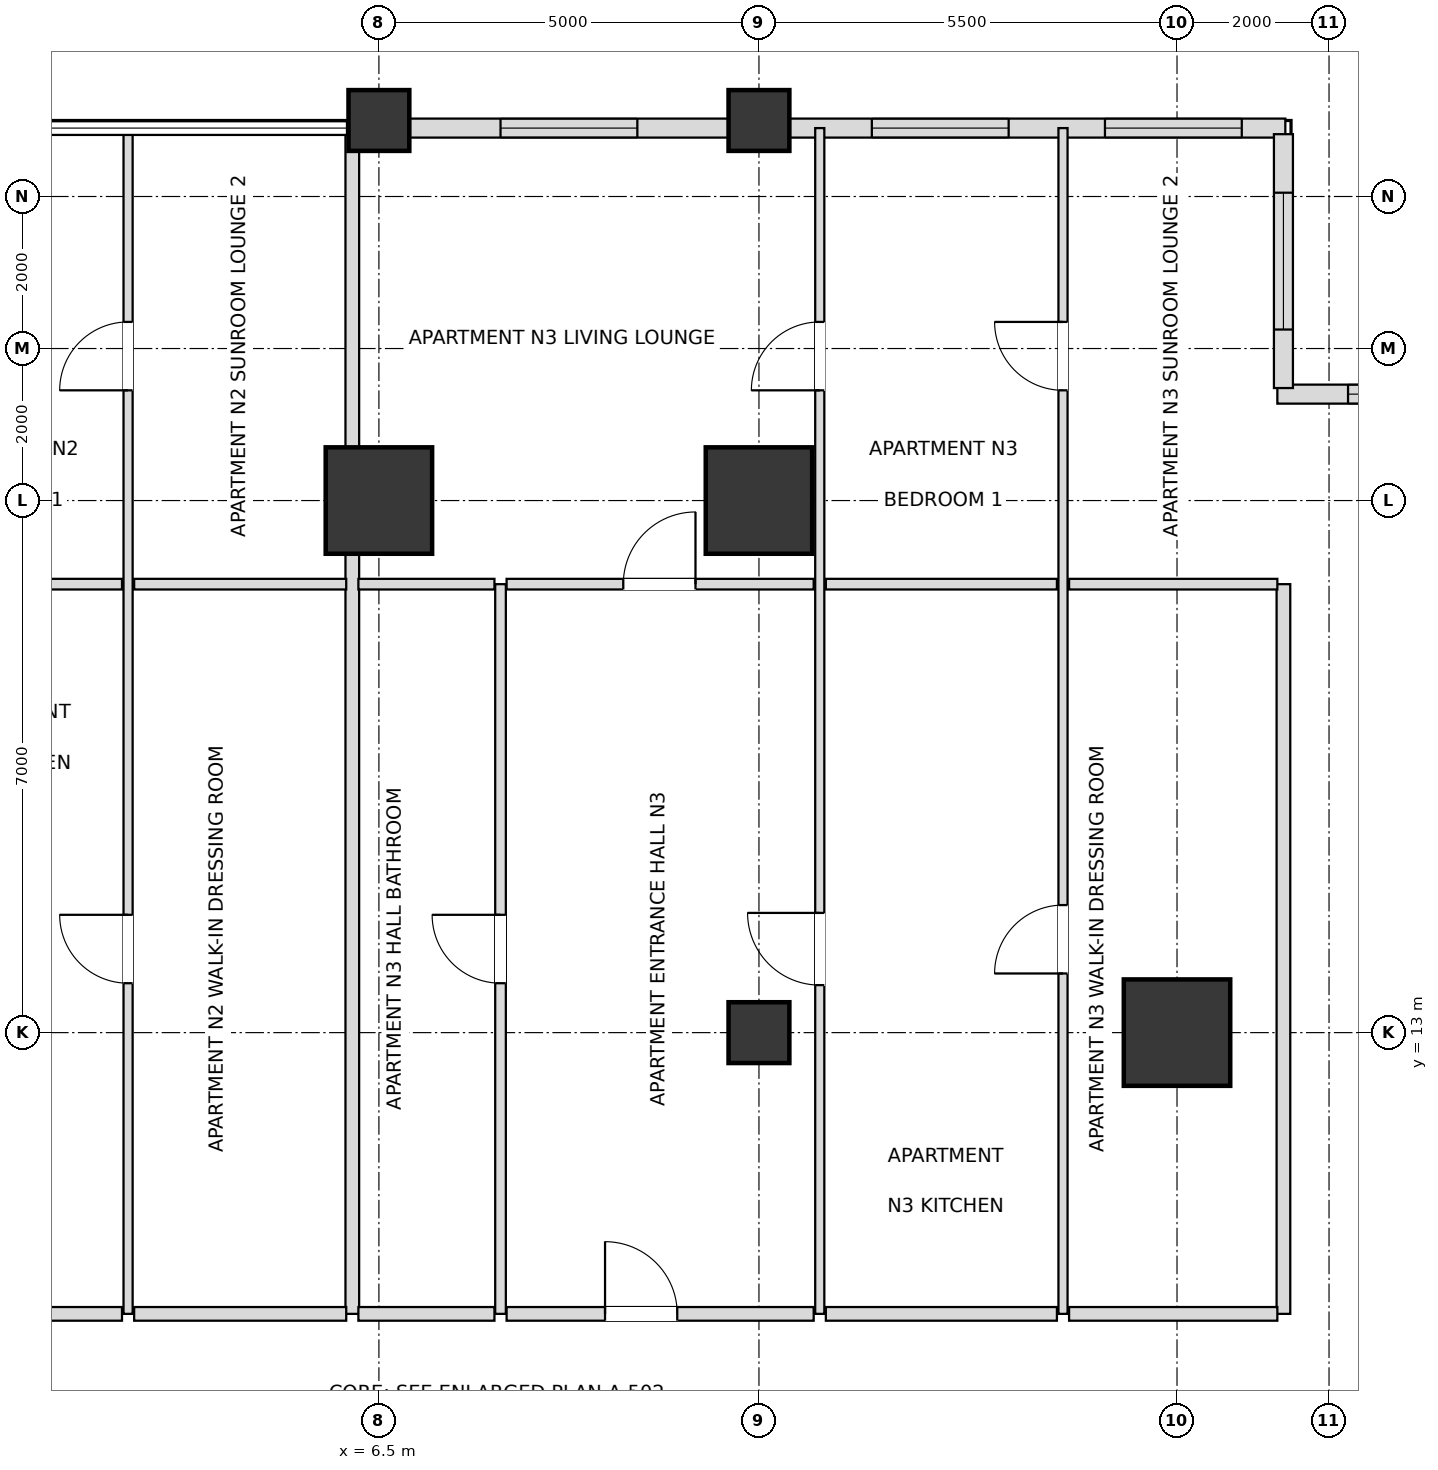
"""IFC4 building model, lengths in metres.
Left out: names, types, materials, properties, quantities, classifications, styles, units other than length and angle.
Written with IfcOpenShell. Run it as: python <this file> out.ifc"""

import sys

from ifc_helpers import new_model, si_unit, direction, frame, frame_2d, origin, origin_2d, place, context, subcontext, project, spatial, rectangle, extrude, element, fill, save


model = new_model("IFC4")
c1 = context("Model", 3, precision=1e-05, world=origin(), true_north=direction((0.0, 1.0)))
c2 = subcontext(c1, "Body", "Model", "MODEL_VIEW")
j1 = project(units=[si_unit("LENGTHUNIT", "METRE"), si_unit("PLANEANGLEUNIT", "RADIAN")], contexts=[c1])
p1 = place(None, origin())
s1 = spatial("IfcSite", under=j1, at=p1, CompositionType="ELEMENT")
p2 = place(p1, origin())
s2 = spatial("IfcBuilding", under=s1, at=p2, CompositionType="ELEMENT")
p3 = place(p2, frame((0.0, 0.0, 46.8)))
s3 = spatial("IfcBuildingStorey", under=s2, at=p3, CompositionType="ELEMENT", Elevation=46.8)
for number, where, z_axis, x_axis in (
    (1, (17.0, 13.0, 0.0), (0.0, 0.0, 1.0), (1.0, 0.0, 0.0)),
    (2, (11.5, 20.0, 0.0), (0.0, 0.0, 1.0), (1.0, 0.0, 0.0)),
    (3, (6.5, 20.0, 0.0), (0.0, 0.0, 1.0), (1.0, 0.0, 0.0)),
):
    element("IfcColumn", number, at=place(p3, frame(where, z_axis=z_axis, x_axis=x_axis)), inside=s3, PredefinedType="USERDEFINED", context=c2, shape_type="SweptSolid", body=[
        extrude(rectangle(XDim=1.4, YDim=1.4, at=origin_2d()), origin(), (0.0, 0.0, 1.0), 3.6),
    ])
for number, where, z_axis, x_axis in (
    (4, (11.5, 13.0, 0.0), (0.0, 0.0, 1.0), (1.0, 0.0, 0.0)),
    (5, (6.5, 25.0, 0.0), (0.0, 0.0, 1.0), (1.0, 0.0, 0.0)),
    (6, (11.5, 25.0, 0.0), (0.0, 0.0, 1.0), (1.0, 0.0, 0.0)),
):
    element("IfcColumn", number, at=place(p3, frame(where, z_axis=z_axis, x_axis=x_axis)), inside=s3, PredefinedType="COLUMN", context=c2, shape_type="SweptSolid", body=[
        extrude(rectangle(XDim=0.8, YDim=0.8, at=origin_2d()), origin(), (0.0, 0.0, 1.0), 3.6),
    ])
p4 = place(p3, frame((18.425, 24.9, 0.0), z_axis=(0.0, 0.0, 1.0), x_axis=(-1.0, 0.0, 0.0)))
e7 = element("IfcWall", 7, at=p4, inside=s3, PredefinedType="SOLIDWALL", context=c2, shape_type="SweptSolid", body=[
    extrude(rectangle(XDim=6.53, YDim=0.25, at=frame_2d((3.265, 0.0))), origin(), (0.0, 0.0, 1.0), 2.736),
])
p5 = place(p4, frame((0.573, 0.0, 0.72)))
e8 = element("IfcOpeningElement", 8, at=p5, cuts=e7, PredefinedType="OPENING", context=c2, shape_type="SweptSolid", body=[
    extrude(rectangle(XDim=1.8, YDim=1.68, at=frame_2d((0.9, 0.84))), frame((0.0, 0.135, 0.0), z_axis=(0.0, -1.0, 0.0), x_axis=(1.0, 0.0, 0.0)), (0.0, 0.0, 1.0), 0.27),
])
p6 = place(p4, frame((3.64, 0.0, 0.72)))
e9 = element("IfcOpeningElement", 9, at=p6, cuts=e7, PredefinedType="OPENING", context=c2, shape_type="SweptSolid", body=[
    extrude(rectangle(XDim=1.8, YDim=1.68, at=frame_2d((0.9, 0.84))), frame((0.0, 0.135, 0.0), z_axis=(0.0, -1.0, 0.0), x_axis=(1.0, 0.0, 0.0)), (0.0, 0.0, 1.0), 0.27),
])
p7 = place(p3, frame((11.105, 24.9, 0.0), z_axis=(0.0, 0.0, 1.0), x_axis=(-1.0, 0.0, 0.0)))
e10 = element("IfcWall", 10, at=p7, inside=s3, PredefinedType="SOLIDWALL", context=c2, shape_type="SweptSolid", body=[
    extrude(rectangle(XDim=4.21, YDim=0.25, at=frame_2d((2.105, 0.0))), origin(), (0.0, 0.0, 1.0), 2.736),
])
p8 = place(p7, frame((1.205, 0.0, 0.72)))
e11 = element("IfcOpeningElement", 11, at=p8, cuts=e10, PredefinedType="OPENING", context=c2, shape_type="SweptSolid", body=[
    extrude(rectangle(XDim=1.8, YDim=1.68, at=frame_2d((0.9, 0.84))), frame((0.0, 0.135, 0.0), z_axis=(0.0, -1.0, 0.0), x_axis=(1.0, 0.0, 0.0)), (0.0, 0.0, 1.0), 0.27),
])
p9 = place(p3, frame((21.98, 21.4, 0.0), z_axis=(0.0, 0.0, 1.0), x_axis=(-1.0, 0.0, 0.0)))
e12 = element("IfcWall", 12, at=p9, inside=s3, PredefinedType="SOLIDWALL", context=c2, shape_type="SweptSolid", body=[
    extrude(rectangle(XDim=3.66, YDim=0.25, at=frame_2d((1.83, 0.0))), origin(), (0.0, 0.0, 1.0), 2.736),
])
p10 = place(p9, frame((0.93, 0.0, 0.72)))
e13 = element("IfcOpeningElement", 13, at=p10, cuts=e12, PredefinedType="OPENING", context=c2, shape_type="SweptSolid", body=[
    extrude(rectangle(XDim=1.8, YDim=1.68, at=frame_2d((0.9, 0.84))), frame((0.0, 0.135, 0.0), z_axis=(0.0, -1.0, 0.0), x_axis=(1.0, 0.0, 0.0)), (0.0, 0.0, 1.0), 0.27),
])
p11 = place(p3, frame((18.4, 21.48, 0.0), z_axis=(0.0, 0.0, 1.0), x_axis=(0.0, 1.0, 0.0)))
e14 = element("IfcWall", 14, at=p11, inside=s3, PredefinedType="SOLIDWALL", context=c2, shape_type="SweptSolid", body=[
    extrude(rectangle(XDim=3.34, YDim=0.25, at=frame_2d((1.67, 0.0))), origin(), (0.0, 0.0, 1.0), 2.736),
])
p12 = place(p11, frame((0.77, 0.0, 0.72)))
e15 = element("IfcOpeningElement", 15, at=p12, cuts=e14, PredefinedType="OPENING", context=c2, shape_type="SweptSolid", body=[
    extrude(rectangle(XDim=1.8, YDim=1.68, at=frame_2d((0.9, 0.84))), frame((0.0, 0.135, 0.0), z_axis=(0.0, -1.0, 0.0), x_axis=(1.0, 0.0, 0.0)), (0.0, 0.0, 1.0), 0.27),
])
p13 = place(p3, frame((3.2, 9.3, 0.0), z_axis=(0.0, 0.0, 1.0), x_axis=(0.0, 1.0, 0.0)))
e16 = element("IfcWall", 16, at=p13, inside=s3, PredefinedType="PARTITIONING", context=c2, shape_type="SweptSolid", body=[
    extrude(rectangle(XDim=15.6, YDim=0.12, at=frame_2d((7.8, 0.0))), origin(), (0.0, 0.0, 1.0), 2.816),
])
p14 = place(p13, frame((4.35, 0.0, 0.0)))
e17 = element("IfcOpeningElement", 17, at=p14, cuts=e16, PredefinedType="OPENING", context=c2, shape_type="SweptSolid", body=[
    extrude(rectangle(XDim=0.9, YDim=2.1, at=frame_2d((0.45, 1.05))), frame((0.0, 0.07, 0.0), z_axis=(0.0, -1.0, 0.0), x_axis=(1.0, 0.0, 0.0)), (0.0, 0.0, 1.0), 0.14),
])
p15 = place(p13, frame((12.15, 0.0, 0.0)))
e18 = element("IfcOpeningElement", 18, at=p15, cuts=e16, PredefinedType="OPENING", context=c2, shape_type="SweptSolid", body=[
    extrude(rectangle(XDim=0.9, YDim=2.1, at=frame_2d((0.45, 1.05))), frame((0.0, 0.07, 0.0), z_axis=(0.0, -1.0, 0.0), x_axis=(1.0, 0.0, 0.0)), (0.0, 0.0, 1.0), 0.14),
])
p16 = place(p3, frame((6.15, 9.3, 0.0), z_axis=(0.0, 0.0, 1.0), x_axis=(0.0, 1.0, 0.0)))
e19 = element("IfcWall", 19, at=p16, inside=s3, PredefinedType="PARTITIONING", context=c2, shape_type="SweptSolid", body=[
    extrude(rectangle(XDim=15.6, YDim=0.18, at=frame_2d((7.8, 0.0))), origin(), (0.0, 0.0, 1.0), 2.816),
])
p17 = place(p3, frame((8.1, 9.3, 0.0), z_axis=(0.0, 0.0, 1.0), x_axis=(0.0, 1.0, 0.0)))
e20 = element("IfcWall", 20, at=p17, inside=s3, PredefinedType="PARTITIONING", context=c2, shape_type="SweptSolid", body=[
    extrude(rectangle(XDim=9.6, YDim=0.14, at=frame_2d((4.8, 0.0))), origin(), (0.0, 0.0, 1.0), 2.816),
])
p18 = place(p17, frame((4.35, 0.0, 0.0)))
e21 = element("IfcOpeningElement", 21, at=p18, cuts=e20, PredefinedType="OPENING", context=c2, shape_type="SweptSolid", body=[
    extrude(rectangle(XDim=0.9, YDim=2.1, at=frame_2d((0.45, 1.05))), frame((0.0, 0.08, 0.0), z_axis=(0.0, -1.0, 0.0), x_axis=(1.0, 0.0, 0.0)), (0.0, 0.0, 1.0), 0.16),
])
p19 = place(p3, frame((12.3, 9.3, 0.0), z_axis=(0.0, 0.0, 1.0), x_axis=(0.0, 1.0, 0.0)))
e22 = element("IfcWall", 22, at=p19, inside=s3, PredefinedType="PARTITIONING", context=c2, shape_type="SweptSolid", body=[
    extrude(rectangle(XDim=15.6, YDim=0.12, at=frame_2d((7.8, 0.0))), origin(), (0.0, 0.0, 1.0), 2.736),
])
p20 = place(p19, frame((4.325, 0.0, 0.0)))
e23 = element("IfcOpeningElement", 23, at=p20, cuts=e22, PredefinedType="OPENING", context=c2, shape_type="SweptSolid", body=[
    extrude(rectangle(XDim=0.95, YDim=2.1, at=frame_2d((0.475, 1.05))), frame((0.0, 0.07, 0.0), z_axis=(0.0, -1.0, 0.0), x_axis=(1.0, 0.0, 0.0)), (0.0, 0.0, 1.0), 0.14),
])
p21 = place(p19, frame((12.15, 0.0, 0.0)))
e24 = element("IfcOpeningElement", 24, at=p21, cuts=e22, PredefinedType="OPENING", context=c2, shape_type="SweptSolid", body=[
    extrude(rectangle(XDim=0.9, YDim=2.1, at=frame_2d((0.45, 1.05))), frame((0.0, 0.07, 0.0), z_axis=(0.0, -1.0, 0.0), x_axis=(1.0, 0.0, 0.0)), (0.0, 0.0, 1.0), 0.14),
])
p22 = place(p3, frame((15.5, 9.3, 0.0), z_axis=(0.0, 0.0, 1.0), x_axis=(0.0, 1.0, 0.0)))
e25 = element("IfcWall", 25, at=p22, inside=s3, PredefinedType="PARTITIONING", context=c2, shape_type="SweptSolid", body=[
    extrude(rectangle(XDim=15.6, YDim=0.12, at=frame_2d((7.8, 0.0))), origin(), (0.0, 0.0, 1.0), 2.736),
])
p23 = place(p22, frame((4.478, 0.0, 0.0)))
e26 = element("IfcOpeningElement", 26, at=p23, cuts=e25, PredefinedType="OPENING", context=c2, shape_type="SweptSolid", body=[
    extrude(rectangle(XDim=0.9, YDim=2.1, at=frame_2d((0.45, 1.05))), frame((0.0, 0.07, 0.0), z_axis=(0.0, -1.0, 0.0), x_axis=(1.0, 0.0, 0.0)), (0.0, 0.0, 1.0), 0.14),
])
p24 = place(p22, frame((12.15, 0.0, 0.0)))
e27 = element("IfcOpeningElement", 27, at=p24, cuts=e25, PredefinedType="OPENING", context=c2, shape_type="SweptSolid", body=[
    extrude(rectangle(XDim=0.9, YDim=2.1, at=frame_2d((0.45, 1.05))), frame((0.0, 0.07, 0.0), z_axis=(0.0, -1.0, 0.0), x_axis=(1.0, 0.0, 0.0)), (0.0, 0.0, 1.0), 0.14),
])
p25 = place(p3, frame((18.4, 9.3, 0.0), z_axis=(0.0, 0.0, 1.0), x_axis=(0.0, 1.0, 0.0)))
e28 = element("IfcWall", 28, at=p25, inside=s3, PredefinedType="PARTITIONING", context=c2, shape_type="SweptSolid", body=[
    extrude(rectangle(XDim=9.6, YDim=0.18, at=frame_2d((4.8, 0.0))), origin(), (0.0, 0.0, 1.0), 2.736),
])
p26 = place(p3, frame((0.08, 9.3, 0.0), z_axis=(0.0, 0.0, 1.0), x_axis=(1.0, 0.0, 0.0)))
e29 = element("IfcWall", 29, at=p26, inside=s3, PredefinedType="PARTITIONING", context=c2, shape_type="SweptSolid", body=[
    extrude(rectangle(XDim=3.04, YDim=0.18, at=frame_2d((1.52, 0.0))), origin(), (0.0, 0.0, 1.0), 3.38),
])
p27 = place(p3, frame((3.28, 9.3, 0.0), z_axis=(0.0, 0.0, 1.0), x_axis=(1.0, 0.0, 0.0)))
e30 = element("IfcWall", 30, at=p27, inside=s3, PredefinedType="PARTITIONING", context=c2, shape_type="SweptSolid", body=[
    extrude(rectangle(XDim=2.79, YDim=0.18, at=frame_2d((1.395, 0.0))), origin(), (0.0, 0.0, 1.0), 3.38),
])
p28 = place(p3, frame((6.23, 9.3, 0.0), z_axis=(0.0, 0.0, 1.0), x_axis=(1.0, 0.0, 0.0)))
e31 = element("IfcWall", 31, at=p28, inside=s3, PredefinedType="PARTITIONING", context=c2, shape_type="SweptSolid", body=[
    extrude(rectangle(XDim=1.79, YDim=0.18, at=frame_2d((0.895, 0.0))), origin(), (0.0, 0.0, 1.0), 2.816),
])
p29 = place(p3, frame((8.18, 9.3, 0.0), z_axis=(0.0, 0.0, 1.0), x_axis=(1.0, 0.0, 0.0)))
e32 = element("IfcWall", 32, at=p29, inside=s3, PredefinedType="PARTITIONING", context=c2, shape_type="SweptSolid", body=[
    extrude(rectangle(XDim=4.04, YDim=0.18, at=frame_2d((2.02, 0.0))), origin(), (0.0, 0.0, 1.0), 3.38),
])
p30 = place(p29, frame((1.295, 0.0, 0.0)))
e33 = element("IfcOpeningElement", 33, at=p30, cuts=e32, PredefinedType="OPENING", context=c2, shape_type="SweptSolid", body=[
    extrude(rectangle(XDim=0.95, YDim=2.15, at=frame_2d((0.475, 1.075))), frame((0.0, 0.1, 0.0), z_axis=(0.0, -1.0, 0.0), x_axis=(1.0, 0.0, 0.0)), (0.0, 0.0, 1.0), 0.2),
])
p31 = place(p3, frame((12.38, 9.3, 0.0), z_axis=(0.0, 0.0, 1.0), x_axis=(1.0, 0.0, 0.0)))
e34 = element("IfcWall", 34, at=p31, inside=s3, PredefinedType="PARTITIONING", context=c2, shape_type="SweptSolid", body=[
    extrude(rectangle(XDim=3.04, YDim=0.18, at=frame_2d((1.52, 0.0))), origin(), (0.0, 0.0, 1.0), 3.38),
])
p32 = place(p3, frame((15.58, 9.3, 0.0), z_axis=(0.0, 0.0, 1.0), x_axis=(1.0, 0.0, 0.0)))
e35 = element("IfcWall", 35, at=p32, inside=s3, PredefinedType="PARTITIONING", context=c2, shape_type="SweptSolid", body=[
    extrude(rectangle(XDim=2.74, YDim=0.18, at=frame_2d((1.37, 0.0))), origin(), (0.0, 0.0, 1.0), 2.816),
])
p33 = place(p3, frame((0.08, 18.9, 0.0), z_axis=(0.0, 0.0, 1.0), x_axis=(1.0, 0.0, 0.0)))
e36 = element("IfcWall", 36, at=p33, inside=s3, PredefinedType="PARTITIONING", context=c2, shape_type="SweptSolid", body=[
    extrude(rectangle(XDim=3.04, YDim=0.14, at=frame_2d((1.52, 0.0))), origin(), (0.0, 0.0, 1.0), 3.38),
])
p34 = place(p3, frame((3.28, 18.9, 0.0), z_axis=(0.0, 0.0, 1.0), x_axis=(1.0, 0.0, 0.0)))
e37 = element("IfcWall", 37, at=p34, inside=s3, PredefinedType="PARTITIONING", context=c2, shape_type="SweptSolid", body=[
    extrude(rectangle(XDim=2.79, YDim=0.14, at=frame_2d((1.395, 0.0))), origin(), (0.0, 0.0, 1.0), 3.38),
])
p35 = place(p3, frame((6.23, 18.9, 0.0), z_axis=(0.0, 0.0, 1.0), x_axis=(1.0, 0.0, 0.0)))
e38 = element("IfcWall", 38, at=p35, inside=s3, PredefinedType="PARTITIONING", context=c2, shape_type="SweptSolid", body=[
    extrude(rectangle(XDim=1.79, YDim=0.14, at=frame_2d((0.895, 0.0))), origin(), (0.0, 0.0, 1.0), 2.816),
])
p36 = place(p3, frame((8.18, 18.9, 0.0), z_axis=(0.0, 0.0, 1.0), x_axis=(1.0, 0.0, 0.0)))
e39 = element("IfcWall", 39, at=p36, inside=s3, PredefinedType="PARTITIONING", context=c2, shape_type="SweptSolid", body=[
    extrude(rectangle(XDim=4.04, YDim=0.14, at=frame_2d((2.02, 0.0))), origin(), (0.0, 0.0, 1.0), 2.736),
])
p37 = place(p36, frame((1.535, 0.0, 0.0)))
e40 = element("IfcOpeningElement", 40, at=p37, cuts=e39, PredefinedType="OPENING", context=c2, shape_type="SweptSolid", body=[
    extrude(rectangle(XDim=0.95, YDim=2.1, at=frame_2d((0.475, 1.05))), frame((0.0, 0.08, 0.0), z_axis=(0.0, -1.0, 0.0), x_axis=(1.0, 0.0, 0.0)), (0.0, 0.0, 1.0), 0.16),
])
p38 = place(p3, frame((12.38, 18.9, 0.0), z_axis=(0.0, 0.0, 1.0), x_axis=(1.0, 0.0, 0.0)))
e41 = element("IfcWall", 41, at=p38, inside=s3, PredefinedType="PARTITIONING", context=c2, shape_type="SweptSolid", body=[
    extrude(rectangle(XDim=3.04, YDim=0.14, at=frame_2d((1.52, 0.0))), origin(), (0.0, 0.0, 1.0), 2.736),
])
p39 = place(p3, frame((15.58, 18.9, 0.0), z_axis=(0.0, 0.0, 1.0), x_axis=(1.0, 0.0, 0.0)))
e42 = element("IfcWall", 42, at=p39, inside=s3, PredefinedType="PARTITIONING", context=c2, shape_type="SweptSolid", body=[
    extrude(rectangle(XDim=2.74, YDim=0.14, at=frame_2d((1.37, 0.0))), origin(), (0.0, 0.0, 1.0), 2.736),
])
p40 = place(p5, origin())
e43 = element("IfcWindow", 43, at=p40, inside=s3, PartitioningType="SINGLE_PANEL", PredefinedType="WINDOW", context=c2, shape_type="SweptSolid", body=[
    extrude(rectangle(XDim=1.8, YDim=1.68, at=frame_2d((0.9, 0.84))), frame((0.0, 0.03, 0.0), z_axis=(0.0, -1.0, 0.0), x_axis=(1.0, 0.0, 0.0)), (0.0, 0.0, 1.0), 0.06),
])
fill(e8, e43)
p41 = place(p6, origin())
e44 = element("IfcWindow", 44, at=p41, inside=s3, PartitioningType="SINGLE_PANEL", PredefinedType="WINDOW", context=c2, shape_type="SweptSolid", body=[
    extrude(rectangle(XDim=1.8, YDim=1.68, at=frame_2d((0.9, 0.84))), frame((0.0, 0.03, 0.0), z_axis=(0.0, -1.0, 0.0), x_axis=(1.0, 0.0, 0.0)), (0.0, 0.0, 1.0), 0.06),
])
fill(e9, e44)
p42 = place(p8, origin())
e45 = element("IfcWindow", 45, at=p42, inside=s3, PartitioningType="SINGLE_PANEL", PredefinedType="WINDOW", context=c2, shape_type="SweptSolid", body=[
    extrude(rectangle(XDim=1.8, YDim=1.68, at=frame_2d((0.9, 0.84))), frame((0.0, 0.03, 0.0), z_axis=(0.0, -1.0, 0.0), x_axis=(1.0, 0.0, 0.0)), (0.0, 0.0, 1.0), 0.06),
])
fill(e11, e45)
p43 = place(p10, origin())
e46 = element("IfcWindow", 46, at=p43, inside=s3, PartitioningType="SINGLE_PANEL", PredefinedType="WINDOW", context=c2, shape_type="SweptSolid", body=[
    extrude(rectangle(XDim=1.8, YDim=1.68, at=frame_2d((0.9, 0.84))), frame((0.0, 0.03, 0.0), z_axis=(0.0, -1.0, 0.0), x_axis=(1.0, 0.0, 0.0)), (0.0, 0.0, 1.0), 0.06),
])
fill(e13, e46)
p44 = place(p12, origin())
e47 = element("IfcWindow", 47, at=p44, inside=s3, PartitioningType="SINGLE_PANEL", PredefinedType="WINDOW", context=c2, shape_type="SweptSolid", body=[
    extrude(rectangle(XDim=1.8, YDim=1.68, at=frame_2d((0.9, 0.84))), frame((0.0, 0.03, 0.0), z_axis=(0.0, -1.0, 0.0), x_axis=(1.0, 0.0, 0.0)), (0.0, 0.0, 1.0), 0.06),
])
fill(e15, e47)
p45 = place(p14, origin())
e48 = element("IfcDoor", 48, at=p45, inside=s3, OperationType="SINGLE_SWING_RIGHT", PredefinedType="DOOR", context=c2, shape_type="SweptSolid", body=[
    extrude(rectangle(XDim=0.9, YDim=2.1, at=frame_2d((0.45, 1.05))), frame((0.0, 0.025, 0.0), z_axis=(0.0, -1.0, 0.0), x_axis=(1.0, 0.0, 0.0)), (0.0, 0.0, 1.0), 0.05),
])
fill(e17, e48)
p46 = place(p15, origin())
e49 = element("IfcDoor", 49, at=p46, inside=s3, OperationType="SINGLE_SWING_LEFT", PredefinedType="DOOR", context=c2, shape_type="SweptSolid", body=[
    extrude(rectangle(XDim=0.9, YDim=2.1, at=frame_2d((0.45, 1.05))), frame((0.0, 0.025, 0.0), z_axis=(0.0, -1.0, 0.0), x_axis=(1.0, 0.0, 0.0)), (0.0, 0.0, 1.0), 0.05),
])
fill(e18, e49)
p47 = place(p18, origin())
e50 = element("IfcDoor", 50, at=p47, inside=s3, OperationType="SINGLE_SWING_RIGHT", PredefinedType="DOOR", context=c2, shape_type="SweptSolid", body=[
    extrude(rectangle(XDim=0.9, YDim=2.1, at=frame_2d((0.45, 1.05))), frame((0.0, 0.025, 0.0), z_axis=(0.0, -1.0, 0.0), x_axis=(1.0, 0.0, 0.0)), (0.0, 0.0, 1.0), 0.05),
])
fill(e21, e50)
p48 = place(p30, origin())
e51 = element("IfcDoor", 51, at=p48, inside=s3, OperationType="SINGLE_SWING_LEFT", PredefinedType="DOOR", context=c2, shape_type="SweptSolid", body=[
    extrude(rectangle(XDim=0.95, YDim=2.15, at=frame_2d((0.475, 1.075))), frame((0.0, 0.025, 0.0), z_axis=(0.0, -1.0, 0.0), x_axis=(1.0, 0.0, 0.0)), (0.0, 0.0, 1.0), 0.05),
])
fill(e33, e51)
p49 = place(p20, origin())
e52 = element("IfcDoor", 52, at=p49, inside=s3, OperationType="SINGLE_SWING_RIGHT", PredefinedType="DOOR", context=c2, shape_type="SweptSolid", body=[
    extrude(rectangle(XDim=0.95, YDim=2.1, at=frame_2d((0.475, 1.05))), frame((0.0, 0.025, 0.0), z_axis=(0.0, -1.0, 0.0), x_axis=(1.0, 0.0, 0.0)), (0.0, 0.0, 1.0), 0.05),
])
fill(e23, e52)
p50 = place(p23, origin())
e53 = element("IfcDoor", 53, at=p50, inside=s3, OperationType="SINGLE_SWING_LEFT", PredefinedType="DOOR", context=c2, shape_type="SweptSolid", body=[
    extrude(rectangle(XDim=0.9, YDim=2.1, at=frame_2d((0.45, 1.05))), frame((0.0, 0.025, 0.0), z_axis=(0.0, -1.0, 0.0), x_axis=(1.0, 0.0, 0.0)), (0.0, 0.0, 1.0), 0.05),
])
fill(e26, e53)
p51 = place(p37, origin())
e54 = element("IfcDoor", 54, at=p51, inside=s3, OperationType="SINGLE_SWING_RIGHT", PredefinedType="DOOR", context=c2, shape_type="SweptSolid", body=[
    extrude(rectangle(XDim=0.95, YDim=2.1, at=frame_2d((0.475, 1.05))), frame((0.0, 0.025, 0.0), z_axis=(0.0, -1.0, 0.0), x_axis=(1.0, 0.0, 0.0)), (0.0, 0.0, 1.0), 0.05),
])
fill(e40, e54)
p52 = place(p21, origin())
e55 = element("IfcDoor", 55, at=p52, inside=s3, OperationType="SINGLE_SWING_LEFT", PredefinedType="DOOR", context=c2, shape_type="SweptSolid", body=[
    extrude(rectangle(XDim=0.9, YDim=2.1, at=frame_2d((0.45, 1.05))), frame((0.0, 0.025, 0.0), z_axis=(0.0, -1.0, 0.0), x_axis=(1.0, 0.0, 0.0)), (0.0, 0.0, 1.0), 0.05),
])
fill(e24, e55)
p53 = place(p24, origin())
e56 = element("IfcDoor", 56, at=p53, inside=s3, OperationType="SINGLE_SWING_RIGHT", PredefinedType="DOOR", context=c2, shape_type="SweptSolid", body=[
    extrude(rectangle(XDim=0.9, YDim=2.1, at=frame_2d((0.45, 1.05))), frame((0.0, 0.025, 0.0), z_axis=(0.0, -1.0, 0.0), x_axis=(1.0, 0.0, 0.0)), (0.0, 0.0, 1.0), 0.05),
])
fill(e27, e56)
save(model, sys.argv[1])
